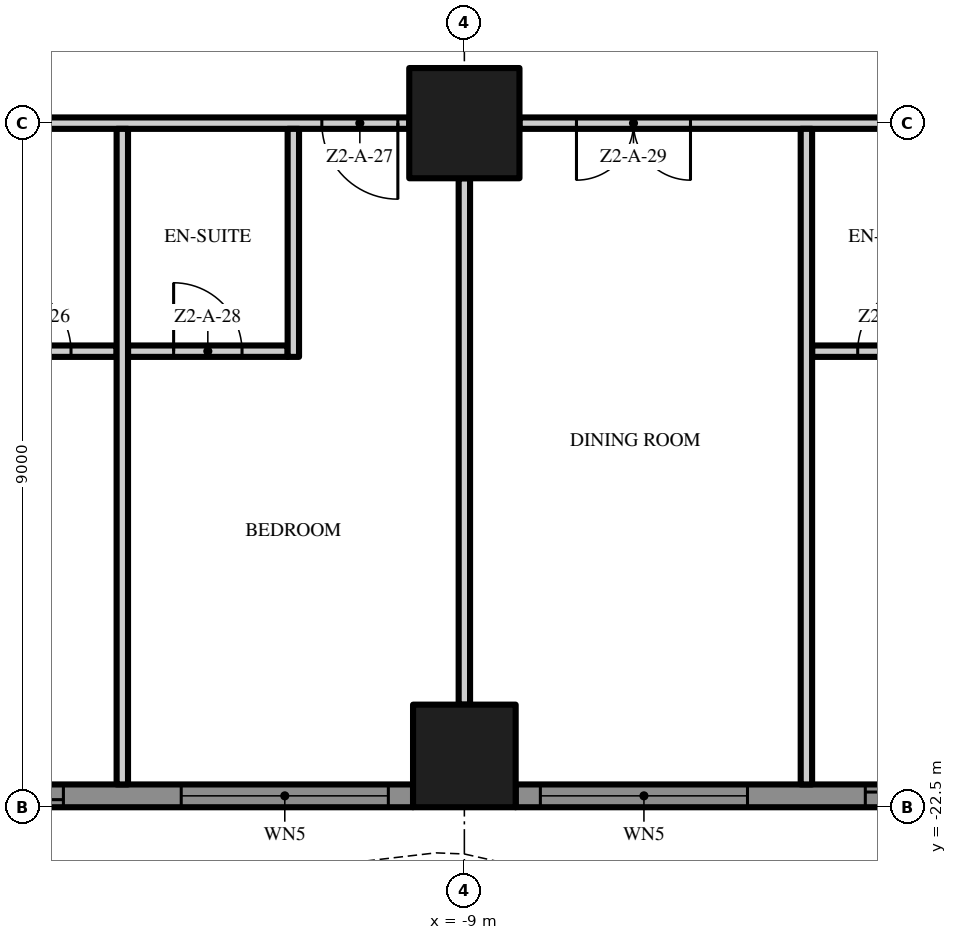
"""IFC4 building model, lengths in metres.
Left out: names, types, materials, properties, quantities, classifications, styles, units other than length and angle.
Written with IfcOpenShell. Run it as: python <this file> out.ifc"""

import sys

from ifc_helpers import new_model, si_unit, direction, frame, frame_2d, origin, origin_2d, place, context, subcontext, project, spatial, polyline, rectangle, outline, extrude, element, fill, save


model = new_model("IFC4")
c1 = context("Model", 3, precision=1e-05, world=origin(), true_north=direction((0.0, 1.0)))
c2 = subcontext(c1, "Body", "Model", "MODEL_VIEW")
j1 = project(units=[si_unit("LENGTHUNIT", "METRE"), si_unit("PLANEANGLEUNIT", "RADIAN")], contexts=[c1])
p1 = place(None, origin())
s1 = spatial("IfcSite", under=j1, at=p1, CompositionType="ELEMENT")
p2 = place(p1, origin())
s2 = spatial("IfcBuilding", under=s1, at=p2, CompositionType="ELEMENT")
p3 = place(p2, frame((0.0, 0.0, 73.2)))
s3 = spatial("IfcBuildingStorey", under=s2, at=p3, CompositionType="ELEMENT", Elevation=73.2)
p4 = place(p3, frame((-9.0, -13.5, 0.0), z_axis=(0.0, 0.0, 1.0), x_axis=(1.0, 0.0, 0.0)))
e1 = element("IfcColumn", 1, at=p4, inside=s3, PredefinedType="COLUMN", context=c2, shape_type="SweptSolid", body=[
    extrude(rectangle(XDim=1.45, YDim=1.45, at=origin_2d()), origin(), (0.0, 0.0, 1.0), 3.5),
])
p5 = place(p3, frame((-9.0, -21.825, 0.0), z_axis=(0.0, 0.0, 1.0), x_axis=(1.0, 0.0, 0.0)))
e2 = element("IfcColumn", 2, at=p5, inside=s3, PredefinedType="COLUMN", context=c2, shape_type="SweptSolid", body=[
    extrude(rectangle(XDim=1.35, YDim=1.35, at=origin_2d()), origin(), (0.0, 0.0, 1.0), 3.5),
])
p6 = place(p3, frame((-9.675, -22.35, 0.0), z_axis=(0.0, 0.0, 1.0), x_axis=(-1.0, 0.0, 0.0)))
e3 = element("IfcWall", 3, at=p6, inside=s3, PredefinedType="SOLIDWALL", context=c2, shape_type="SweptSolid", body=[
    extrude(rectangle(XDim=7.65, YDim=0.3, at=frame_2d((3.825, 0.0))), origin(), (0.0, 0.0, 1.0), 3.5),
])
p7 = place(p6, frame((4.6, 0.0, 0.0)))
e4 = element("IfcOpeningElement", 4, at=p7, cuts=e3, PredefinedType="OPENING", context=c2, shape_type="SweptSolid", body=[
    extrude(rectangle(XDim=2.725, YDim=2.4, at=frame_2d((1.363, 1.2))), frame((0.0, 0.16, 0.0), z_axis=(0.0, -1.0, 0.0), x_axis=(1.0, 0.0, 0.0)), (0.0, 0.0, 1.0), 0.32),
])
p8 = place(p6, frame((0.325, 0.0, 0.45)))
e5 = element("IfcOpeningElement", 5, at=p8, cuts=e3, PredefinedType="OPENING", context=c2, shape_type="SweptSolid", body=[
    extrude(rectangle(XDim=2.725, YDim=2.65, at=frame_2d((1.363, 1.325))), frame((0.0, 0.16, 0.0), z_axis=(0.0, -1.0, 0.0), x_axis=(1.0, 0.0, 0.0)), (0.0, 0.0, 1.0), 0.32),
])
p9 = place(p3, frame((-0.675, -22.35, 0.0), z_axis=(0.0, 0.0, 1.0), x_axis=(-1.0, 0.0, 0.0)))
e6 = element("IfcWall", 6, at=p9, inside=s3, PredefinedType="SOLIDWALL", context=c2, shape_type="SweptSolid", body=[
    extrude(rectangle(XDim=7.65, YDim=0.3, at=frame_2d((3.825, 0.0))), origin(), (0.0, 0.0, 1.0), 3.5),
])
p10 = place(p9, frame((4.6, 0.0, 0.45)))
e7 = element("IfcOpeningElement", 7, at=p10, cuts=e6, PredefinedType="OPENING", context=c2, shape_type="SweptSolid", body=[
    extrude(rectangle(XDim=2.725, YDim=2.65, at=frame_2d((1.363, 1.325))), frame((0.0, 0.16, 0.0), z_axis=(0.0, -1.0, 0.0), x_axis=(1.0, 0.0, 0.0)), (0.0, 0.0, 1.0), 0.32),
])
p11 = place(p9, frame((0.325, 0.0, 0.0)))
e8 = element("IfcOpeningElement", 8, at=p11, cuts=e6, PredefinedType="OPENING", context=c2, shape_type="SweptSolid", body=[
    extrude(rectangle(XDim=2.725, YDim=2.4, at=frame_2d((1.363, 1.2))), frame((0.0, 0.16, 0.0), z_axis=(0.0, -1.0, 0.0), x_axis=(1.0, 0.0, 0.0)), (0.0, 0.0, 1.0), 0.32),
])
p12 = place(p3, origin())
e9 = element("IfcWall", 9, at=p12, inside=s3, PredefinedType="USERDEFINED", context=c2, shape_type="SweptSolid", body=[
    extrude(outline(polyline([(-22.5, -23.451), (-21.0, -24.112), (-19.5, -24.845), (-18.0, -25.369), (-16.875, -25.5), (-16.5, -25.485), (-15.0, -25.149), (-13.5, -24.488), (-12.0, -23.755), (-10.5, -23.231), (-9.375, -23.1), (-9.0, -23.115), (-7.5, -23.451), (-6.0, -24.112), (-4.5, -24.845), (-3.0, -25.369), (-1.875, -25.5), (-1.5, -25.485), (0.0, -25.149), (1.5, -24.488), (3.0, -23.755), (4.5, -23.231), (5.625, -23.1), (6.0, -23.115), (7.5, -23.451), (9.0, -24.112), (10.5, -24.845), (12.0, -25.369), (13.125, -25.5), (13.5, -25.485), (15.0, -25.149), (16.5, -24.488), (18.0, -23.755), (19.5, -23.231), (20.625, -23.1), (21.0, -23.115), (22.5, -23.451), (22.555, -23.208), (21.033, -22.866), (20.615, -22.849), (19.444, -22.986), (17.904, -23.524), (16.395, -24.261), (14.921, -24.91), (13.467, -25.236), (13.135, -25.249), (12.056, -25.124), (10.596, -24.614), (9.105, -23.885), (7.579, -23.213), (6.033, -22.866), (5.615, -22.849), (4.444, -22.986), (2.904, -23.524), (1.395, -24.261), (-0.079, -24.91), (-1.533, -25.236), (-1.865, -25.249), (-2.944, -25.124), (-4.404, -24.614), (-5.895, -23.885), (-7.421, -23.213), (-8.967, -22.866), (-9.385, -22.849), (-10.556, -22.986), (-12.096, -23.524), (-13.605, -24.261), (-15.079, -24.91), (-16.533, -25.236), (-16.865, -25.249), (-17.944, -25.124), (-19.404, -24.614), (-20.895, -23.885), (-22.399, -23.223), (-22.5, -23.451)])), origin(), (0.0, 0.0, 1.0), 0.9),
])
p13 = place(p3, frame((-15.675, -16.5, 0.0), z_axis=(0.0, 0.0, 1.0), x_axis=(1.0, 0.0, 0.0)))
e10 = element("IfcWall", 10, at=p13, inside=s3, PredefinedType="PARTITIONING", context=c2, shape_type="SweptSolid", body=[
    extrude(rectangle(XDim=2.1, YDim=0.15, at=frame_2d((1.05, 0.0))), origin(), (0.0, 0.0, 1.0), 3.5),
])
p14 = place(p13, frame((0.6, 0.0, 0.0)))
e11 = element("IfcOpeningElement", 11, at=p14, cuts=e10, PredefinedType="OPENING", context=c2, shape_type="SweptSolid", body=[
    extrude(rectangle(XDim=0.9, YDim=2.1, at=frame_2d((0.45, 1.05))), frame((0.0, 0.085, 0.0), z_axis=(0.0, -1.0, 0.0), x_axis=(1.0, 0.0, 0.0)), (0.0, 0.0, 1.0), 0.17),
])
p15 = place(p3, frame((-13.425, -16.5, 0.0), z_axis=(0.0, 0.0, 1.0), x_axis=(1.0, 0.0, 0.0)))
e12 = element("IfcWall", 12, at=p15, inside=s3, PredefinedType="PARTITIONING", context=c2, shape_type="SweptSolid", body=[
    extrude(rectangle(XDim=2.1, YDim=0.15, at=frame_2d((1.05, 0.0))), origin(), (0.0, 0.0, 1.0), 3.5),
])
p16 = place(p15, frame((0.6, 0.0, 0.0)))
e13 = element("IfcOpeningElement", 13, at=p16, cuts=e12, PredefinedType="OPENING", context=c2, shape_type="SweptSolid", body=[
    extrude(rectangle(XDim=0.9, YDim=2.1, at=frame_2d((0.45, 1.05))), frame((0.0, 0.085, 0.0), z_axis=(0.0, -1.0, 0.0), x_axis=(1.0, 0.0, 0.0)), (0.0, 0.0, 1.0), 0.17),
])
p17 = place(p3, frame((-4.425, -16.5, 0.0), z_axis=(0.0, 0.0, 1.0), x_axis=(1.0, 0.0, 0.0)))
e14 = element("IfcWall", 14, at=p17, inside=s3, PredefinedType="PARTITIONING", context=c2, shape_type="SweptSolid", body=[
    extrude(rectangle(XDim=2.1, YDim=0.15, at=frame_2d((1.05, 0.0))), origin(), (0.0, 0.0, 1.0), 3.5),
])
p18 = place(p17, frame((0.6, 0.0, 0.0)))
e15 = element("IfcOpeningElement", 15, at=p18, cuts=e14, PredefinedType="OPENING", context=c2, shape_type="SweptSolid", body=[
    extrude(rectangle(XDim=0.9, YDim=2.1, at=frame_2d((0.45, 1.05))), frame((0.0, 0.085, 0.0), z_axis=(0.0, -1.0, 0.0), x_axis=(1.0, 0.0, 0.0)), (0.0, 0.0, 1.0), 0.17),
])
p19 = place(p3, frame((-9.725, -13.5, 0.0), z_axis=(0.0, 0.0, 1.0), x_axis=(-1.0, 0.0, 0.0)))
e16 = element("IfcWall", 16, at=p19, inside=s3, PredefinedType="PARTITIONING", context=c2, shape_type="SweptSolid", body=[
    extrude(rectangle(XDim=7.55, YDim=0.15, at=frame_2d((3.775, 0.0))), origin(), (0.0, 0.0, 1.0), 3.5),
])
p20 = place(p19, frame((6.4, 0.0, 0.0)))
e17 = element("IfcOpeningElement", 17, at=p20, cuts=e16, PredefinedType="OPENING", context=c2, shape_type="SweptSolid", body=[
    extrude(rectangle(XDim=1.0, YDim=2.4, at=frame_2d((0.5, 1.2))), frame((0.0, 0.085, 0.0), z_axis=(0.0, -1.0, 0.0), x_axis=(1.0, 0.0, 0.0)), (0.0, 0.0, 1.0), 0.17),
])
p21 = place(p19, frame((0.15, 0.0, 0.0)))
e18 = element("IfcOpeningElement", 18, at=p21, cuts=e16, PredefinedType="OPENING", context=c2, shape_type="SweptSolid", body=[
    extrude(rectangle(XDim=1.0, YDim=2.4, at=frame_2d((0.5, 1.2))), frame((0.0, 0.085, 0.0), z_axis=(0.0, -1.0, 0.0), x_axis=(1.0, 0.0, 0.0)), (0.0, 0.0, 1.0), 0.17),
])
p22 = place(p3, frame((-0.725, -13.5, 0.0), z_axis=(0.0, 0.0, 1.0), x_axis=(-1.0, 0.0, 0.0)))
e19 = element("IfcWall", 19, at=p22, inside=s3, PredefinedType="PARTITIONING", context=c2, shape_type="SweptSolid", body=[
    extrude(rectangle(XDim=7.55, YDim=0.15, at=frame_2d((3.775, 0.0))), origin(), (0.0, 0.0, 1.0), 3.5),
])
p23 = place(p22, frame((5.3, 0.0, 0.0)))
e20 = element("IfcOpeningElement", 20, at=p23, cuts=e19, PredefinedType="OPENING", context=c2, shape_type="SweptSolid", body=[
    extrude(rectangle(XDim=1.5, YDim=2.4, at=frame_2d((0.75, 1.2))), frame((0.0, 0.085, 0.0), z_axis=(0.0, -1.0, 0.0), x_axis=(1.0, 0.0, 0.0)), (0.0, 0.0, 1.0), 0.17),
])
p24 = place(p22, frame((0.15, 0.0, 0.0)))
e21 = element("IfcOpeningElement", 21, at=p24, cuts=e19, PredefinedType="OPENING", context=c2, shape_type="SweptSolid", body=[
    extrude(rectangle(XDim=1.0, YDim=2.4, at=frame_2d((0.5, 1.2))), frame((0.0, 0.085, 0.0), z_axis=(0.0, -1.0, 0.0), x_axis=(1.0, 0.0, 0.0)), (0.0, 0.0, 1.0), 0.17),
])
p25 = place(p3, frame((-13.5, -22.2, 0.0), z_axis=(0.0, 0.0, 1.0), x_axis=(0.0, 1.0, 0.0)))
e22 = element("IfcWall", 22, at=p25, inside=s3, PredefinedType="PARTITIONING", context=c2, shape_type="SweptSolid", body=[
    extrude(rectangle(XDim=8.625, YDim=0.15, at=frame_2d((4.312, 0.0))), origin(), (0.0, 0.0, 1.0), 3.5),
])
p26 = place(p3, frame((-11.25, -16.575, 0.0), z_axis=(0.0, 0.0, 1.0), x_axis=(0.0, 1.0, 0.0)))
e23 = element("IfcWall", 23, at=p26, inside=s3, PredefinedType="PARTITIONING", context=c2, shape_type="SweptSolid", body=[
    extrude(rectangle(XDim=3.0, YDim=0.15, at=frame_2d((1.5, 0.0))), origin(), (0.0, 0.0, 1.0), 3.5),
])
p27 = place(p3, frame((-9.0, -21.15, 0.0), z_axis=(0.0, 0.0, 1.0), x_axis=(0.0, 1.0, 0.0)))
e24 = element("IfcWall", 24, at=p27, inside=s3, PredefinedType="PARTITIONING", context=c2, shape_type="SweptSolid", body=[
    extrude(rectangle(XDim=6.925, YDim=0.15, at=frame_2d((3.462, 0.0))), origin(), (0.0, 0.0, 1.0), 3.5),
])
p28 = place(p3, frame((-4.5, -22.2, 0.0), z_axis=(0.0, 0.0, 1.0), x_axis=(0.0, 1.0, 0.0)))
e25 = element("IfcWall", 25, at=p28, inside=s3, PredefinedType="PARTITIONING", context=c2, shape_type="SweptSolid", body=[
    extrude(rectangle(XDim=8.625, YDim=0.15, at=frame_2d((4.312, 0.0))), origin(), (0.0, 0.0, 1.0), 3.5),
])
p29 = place(p7, origin())
e26 = element("IfcDoor", 26, at=p29, inside=s3, OperationType="SINGLE_SWING_LEFT", PredefinedType="DOOR", context=c2, shape_type="SweptSolid", body=[
    extrude(rectangle(XDim=2.725, YDim=2.4, at=frame_2d((1.363, 1.2))), frame((0.0, 0.025, 0.0), z_axis=(0.0, -1.0, 0.0), x_axis=(1.0, 0.0, 0.0)), (0.0, 0.0, 1.0), 0.05),
])
fill(e4, e26)
p30 = place(p8, origin())
e27 = element("IfcWindow", 27, at=p30, inside=s3, PartitioningType="SINGLE_PANEL", PredefinedType="WINDOW", context=c2, shape_type="SweptSolid", body=[
    extrude(rectangle(XDim=2.725, YDim=2.65, at=frame_2d((1.363, 1.325))), frame((0.0, 0.03, 0.0), z_axis=(0.0, -1.0, 0.0), x_axis=(1.0, 0.0, 0.0)), (0.0, 0.0, 1.0), 0.06),
])
fill(e5, e27)
p31 = place(p10, origin())
e28 = element("IfcWindow", 28, at=p31, inside=s3, PartitioningType="SINGLE_PANEL", PredefinedType="WINDOW", context=c2, shape_type="SweptSolid", body=[
    extrude(rectangle(XDim=2.725, YDim=2.65, at=frame_2d((1.363, 1.325))), frame((0.0, 0.03, 0.0), z_axis=(0.0, -1.0, 0.0), x_axis=(1.0, 0.0, 0.0)), (0.0, 0.0, 1.0), 0.06),
])
fill(e7, e28)
p32 = place(p11, origin())
e29 = element("IfcDoor", 29, at=p32, inside=s3, OperationType="SINGLE_SWING_LEFT", PredefinedType="DOOR", context=c2, shape_type="SweptSolid", body=[
    extrude(rectangle(XDim=2.725, YDim=2.4, at=frame_2d((1.363, 1.2))), frame((0.0, 0.025, 0.0), z_axis=(0.0, -1.0, 0.0), x_axis=(1.0, 0.0, 0.0)), (0.0, 0.0, 1.0), 0.05),
])
fill(e8, e29)
p33 = place(p14, origin())
e30 = element("IfcDoor", 30, at=p33, inside=s3, OperationType="SINGLE_SWING_LEFT", PredefinedType="DOOR", context=c2, shape_type="SweptSolid", body=[
    extrude(rectangle(XDim=0.9, YDim=2.1, at=frame_2d((0.45, 1.05))), frame((0.0, 0.025, 0.0), z_axis=(0.0, -1.0, 0.0), x_axis=(1.0, 0.0, 0.0)), (0.0, 0.0, 1.0), 0.05),
])
fill(e11, e30)
p34 = place(p21, origin())
e31 = element("IfcDoor", 31, at=p34, inside=s3, OperationType="SINGLE_SWING_LEFT", PredefinedType="DOOR", context=c2, shape_type="SweptSolid", body=[
    extrude(rectangle(XDim=1.0, YDim=2.4, at=frame_2d((0.5, 1.2))), frame((0.0, 0.025, 0.0), z_axis=(0.0, -1.0, 0.0), x_axis=(1.0, 0.0, 0.0)), (0.0, 0.0, 1.0), 0.05),
])
fill(e18, e31)
p35 = place(p16, origin())
e32 = element("IfcDoor", 32, at=p35, inside=s3, OperationType="SINGLE_SWING_LEFT", PredefinedType="DOOR", context=c2, shape_type="SweptSolid", body=[
    extrude(rectangle(XDim=0.9, YDim=2.1, at=frame_2d((0.45, 1.05))), frame((0.0, 0.025, 0.0), z_axis=(0.0, -1.0, 0.0), x_axis=(1.0, 0.0, 0.0)), (0.0, 0.0, 1.0), 0.05),
])
fill(e13, e32)
p36 = place(p23, origin())
e33 = element("IfcDoor", 33, at=p36, inside=s3, OperationType="DOUBLE_DOOR_SINGLE_SWING", PredefinedType="DOOR", context=c2, shape_type="SweptSolid", body=[
    extrude(rectangle(XDim=1.5, YDim=2.4, at=frame_2d((0.75, 1.2))), frame((0.0, 0.025, 0.0), z_axis=(0.0, -1.0, 0.0), x_axis=(1.0, 0.0, 0.0)), (0.0, 0.0, 1.0), 0.05),
])
fill(e20, e33)
p37 = place(p18, origin())
e34 = element("IfcDoor", 34, at=p37, inside=s3, OperationType="SINGLE_SWING_RIGHT", PredefinedType="DOOR", context=c2, shape_type="SweptSolid", body=[
    extrude(rectangle(XDim=0.9, YDim=2.1, at=frame_2d((0.45, 1.05))), frame((0.0, 0.025, 0.0), z_axis=(0.0, -1.0, 0.0), x_axis=(1.0, 0.0, 0.0)), (0.0, 0.0, 1.0), 0.05),
])
fill(e15, e34)
save(model, sys.argv[1])
